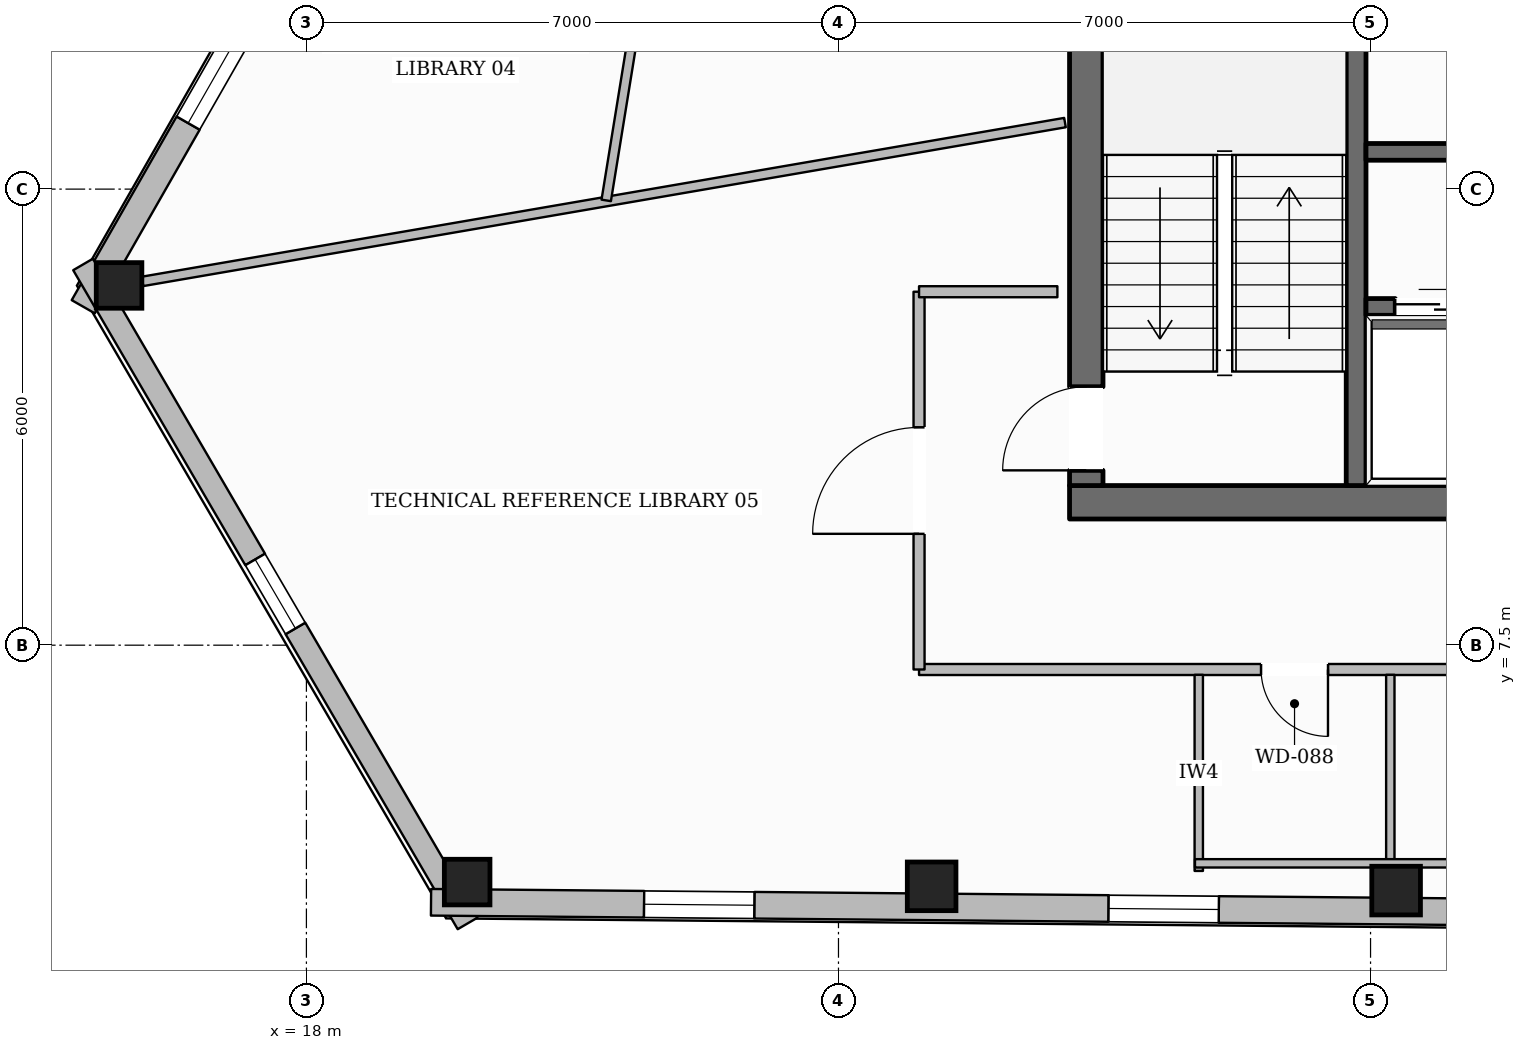
"""IFC4 building model, lengths in metres.
Left out: names, types, materials, properties, quantities, classifications, styles, units other than length and angle.
Written with IfcOpenShell. Run it as: python <this file> out.ifc"""

import sys

from ifc_helpers import new_model, si_unit, direction, frame, frame_2d, origin, origin_2d, place, context, subcontext, project, spatial, rectangle, hollow_rectangle, extrude, element, fill, save


model = new_model("IFC4")
c1 = context("Model", 3, precision=1e-05, world=origin(), true_north=direction((0.0, 1.0)))
c2 = subcontext(c1, "Body", "Model", "MODEL_VIEW")
j1 = project(units=[si_unit("LENGTHUNIT", "METRE"), si_unit("PLANEANGLEUNIT", "RADIAN")], contexts=[c1])
p1 = place(None, origin())
s1 = spatial("IfcSite", under=j1, at=p1, CompositionType="ELEMENT")
p2 = place(p1, origin())
s2 = spatial("IfcBuilding", under=s1, at=p2, CompositionType="ELEMENT")
p3 = place(p2, frame((0.0, 0.0, 180.4)))
s3 = spatial("IfcBuildingStorey", under=s2, at=p3, CompositionType="ELEMENT", Elevation=180.4)
p4 = place(p3, frame((28.04, 9.38, 0.0), z_axis=(0.0, 0.0, 1.0), x_axis=(1.0, 0.0, 0.0)))
e1 = element("IfcWall", 1, at=p4, inside=s3, PredefinedType="SOLIDWALL", context=c2, shape_type="SweptSolid", body=[
    extrude(rectangle(XDim=19.92, YDim=0.44, at=frame_2d((9.96, 0.0))), origin(), (0.0, 0.0, 1.0), 3.6),
])
p5 = place(p4, frame((10.46, 0.0, 0.0)))
e2 = element("IfcOpeningElement", 2, at=p5, cuts=e1, PredefinedType="OPENING", context=c2, shape_type="SweptSolid", body=[
    extrude(rectangle(XDim=1.4, YDim=2.2, at=frame_2d((0.7, 1.1))), frame((0.0, 0.23, 0.0), z_axis=(0.0, -1.0, 0.0), x_axis=(1.0, 0.0, 0.0)), (0.0, 0.0, 1.0), 0.46),
])
p6 = place(p3, frame((28.26, 9.6, 0.0), z_axis=(0.0, 0.0, 1.0), x_axis=(0.0, 1.0, 0.0)))
e3 = element("IfcWall", 3, at=p6, inside=s3, PredefinedType="SOLIDWALL", context=c2, shape_type="SweptSolid", body=[
    extrude(rectangle(XDim=13.0, YDim=0.44, at=frame_2d((6.5, 0.0))), origin(), (0.0, 0.0, 1.0), 3.6),
])
p7 = place(p6, frame((0.2, 0.0, 0.0)))
e4 = element("IfcOpeningElement", 4, at=p7, cuts=e3, PredefinedType="OPENING", context=c2, shape_type="SweptSolid", body=[
    extrude(rectangle(XDim=1.1, YDim=2.15, at=frame_2d((0.55, 1.075))), frame((0.0, 0.23, 0.0), z_axis=(0.0, -1.0, 0.0), x_axis=(1.0, 0.0, 0.0)), (0.0, 0.0, 1.0), 0.46),
])
p8 = place(p6, frame((8.4, 0.0, 0.0)))
e5 = element("IfcOpeningElement", 5, at=p8, cuts=e3, PredefinedType="OPENING", context=c2, shape_type="SweptSolid", body=[
    extrude(rectangle(XDim=0.9, YDim=2.1, at=frame_2d((0.45, 1.05))), frame((0.0, 0.23, 0.0), z_axis=(0.0, -1.0, 0.0), x_axis=(1.0, 0.0, 0.0)), (0.0, 0.0, 1.0), 0.46),
])
p9 = place(p3, frame((31.81, 9.6, 0.0), z_axis=(0.0, 0.0, 1.0), x_axis=(0.0, 1.0, 0.0)))
e6 = element("IfcWall", 6, at=p9, inside=s3, PredefinedType="SHEAR", context=c2, shape_type="SweptSolid", body=[
    extrude(rectangle(XDim=13.0, YDim=0.26, at=frame_2d((6.5, 0.0))), origin(), (0.0, 0.0, 1.0), 3.6),
])
p10 = place(p9, frame((10.925, 0.0, 0.0)))
e7 = element("IfcOpeningElement", 7, at=p10, cuts=e6, PredefinedType="OPENING", context=c2, shape_type="SweptSolid", body=[
    extrude(rectangle(XDim=1.25, YDim=2.25, at=frame_2d((0.625, 1.125))), frame((0.0, 0.14, 0.0), z_axis=(0.0, -1.0, 0.0), x_axis=(1.0, 0.0, 0.0)), (0.0, 0.0, 1.0), 0.28),
])
p11 = place(p3, frame((31.94, 13.99, 0.0), z_axis=(0.0, 0.0, 1.0), x_axis=(1.0, 0.0, 0.0)))
e8 = element("IfcWall", 8, at=p11, inside=s3, PredefinedType="SOLIDWALL", context=c2, shape_type="SweptSolid", body=[
    extrude(rectangle(XDim=12.12, YDim=0.22, at=frame_2d((6.06, 0.0))), origin(), (0.0, 0.0, 1.0), 3.6),
])
p12 = place(p11, frame((1.91, 0.0, 0.0)))
e9 = element("IfcOpeningElement", 9, at=p12, cuts=e8, PredefinedType="OPENING", context=c2, shape_type="SweptSolid", body=[
    extrude(rectangle(XDim=0.9, YDim=2.1, at=frame_2d((0.45, 1.05))), frame((0.0, 0.12, 0.0), z_axis=(0.0, -1.0, 0.0), x_axis=(1.0, 0.0, 0.0)), (0.0, 0.0, 1.0), 0.24),
])
p13 = place(p11, frame((7.95, 0.0, 0.0)))
e10 = element("IfcOpeningElement", 10, at=p13, cuts=e8, PredefinedType="OPENING", context=c2, shape_type="SweptSolid", body=[
    extrude(rectangle(XDim=1.02, YDim=2.15, at=frame_2d((0.51, 1.075))), frame((0.0, 0.12, 0.0), z_axis=(0.0, -1.0, 0.0), x_axis=(1.0, 0.0, 0.0)), (0.0, 0.0, 1.0), 0.24),
])
p14 = place(p3, frame((31.94, 11.95, 0.0), z_axis=(0.0, 0.0, 1.0), x_axis=(1.0, 0.0, 0.0)))
e11 = element("IfcWall", 11, at=p14, inside=s3, PredefinedType="SOLIDWALL", context=c2, shape_type="SweptSolid", body=[
    extrude(rectangle(XDim=6.19, YDim=0.22, at=frame_2d((3.095, 0.0))), origin(), (0.0, 0.0, 1.0), 3.6),
])
p15 = place(p14, frame((0.385, 0.0, 0.0)))
e12 = element("IfcOpeningElement", 12, at=p15, cuts=e11, PredefinedType="OPENING", context=c2, shape_type="SweptSolid", body=[
    extrude(rectangle(XDim=1.1, YDim=2.2, at=frame_2d((0.55, 1.1))), frame((0.0, 0.12, 0.0), z_axis=(0.0, -1.0, 0.0), x_axis=(1.0, 0.0, 0.0)), (0.0, 0.0, 1.0), 0.24),
])
p16 = place(p14, frame((2.435, 0.0, 0.0)))
e13 = element("IfcOpeningElement", 13, at=p16, cuts=e11, PredefinedType="OPENING", context=c2, shape_type="SweptSolid", body=[
    extrude(rectangle(XDim=1.1, YDim=2.2, at=frame_2d((0.55, 1.1))), frame((0.0, 0.12, 0.0), z_axis=(0.0, -1.0, 0.0), x_axis=(1.0, 0.0, 0.0)), (0.0, 0.0, 1.0), 0.24),
])
p17 = place(p14, frame((4.485, 0.0, 0.0)))
e14 = element("IfcOpeningElement", 14, at=p17, cuts=e11, PredefinedType="OPENING", context=c2, shape_type="SweptSolid", body=[
    extrude(rectangle(XDim=1.1, YDim=2.2, at=frame_2d((0.55, 1.1))), frame((0.0, 0.12, 0.0), z_axis=(0.0, -1.0, 0.0), x_axis=(1.0, 0.0, 0.0)), (0.0, 0.0, 1.0), 0.24),
])
for number, where, z_axis, x_axis in (
    (15, (15.535, 12.233, 0.0), (0.0, 0.0, 1.0), (1.0, 0.0, 0.0)),
    (16, (20.115, 4.383, 0.0), (0.0, 0.0, 1.0), (1.0, 0.0, 0.0)),
):
    element("IfcColumn", number, at=place(p3, frame(where, z_axis=z_axis, x_axis=x_axis)), inside=s3, PredefinedType="COLUMN", context=c2, shape_type="SweptSolid", body=[
        extrude(hollow_rectangle(XDim=0.6, YDim=0.6, WallThickness=0.028, at=origin_2d()), origin(), (0.0, 0.0, 1.0), 3.6),
    ])
for number, where, z_axis, x_axis in (
    (17, (26.226, 4.327, 0.0), (0.0, 0.0, 1.0), (1.0, 0.0, 0.0)),
    (18, (32.336, 4.271, 0.0), (0.0, 0.0, 1.0), (1.0, 0.0, 0.0)),
):
    element("IfcColumn", number, at=place(p3, frame(where, z_axis=z_axis, x_axis=x_axis)), inside=s3, PredefinedType="COLUMN", context=c2, shape_type="SweptSolid", body=[
        extrude(hollow_rectangle(XDim=0.64, YDim=0.64, WallThickness=0.028, at=origin_2d()), origin(), (0.0, 0.0, 1.0), 3.6),
    ])
p18 = place(p3, frame((15.064, 11.953, 0.0), z_axis=(0.0, 0.0, 1.0), x_axis=(0.495993114815, 0.86832645362, 0.0)))
e19 = element("IfcWall", 19, at=p18, inside=s3, PredefinedType="STANDARD", context=c2, shape_type="SweptSolid", body=[
    extrude(rectangle(XDim=37.324, YDim=0.35, at=frame_2d((18.662, 0.0))), origin(), (0.0, 0.0, 1.0), 3.132),
])
p19 = place(p18, frame((33.087, 0.0, 0.65)))
e20 = element("IfcOpeningElement", 20, at=p19, cuts=e19, PredefinedType="OPENING", context=c2, shape_type="SweptSolid", body=[
    extrude(rectangle(XDim=1.45, YDim=1.75, at=frame_2d((0.725, 0.875))), frame((0.0, 0.185, 0.0), z_axis=(0.0, -1.0, 0.0), x_axis=(1.0, 0.0, 0.0)), (0.0, 0.0, 1.0), 0.37),
])
p20 = place(p18, frame((27.026, 0.0, 0.65)))
e21 = element("IfcOpeningElement", 21, at=p20, cuts=e19, PredefinedType="OPENING", context=c2, shape_type="SweptSolid", body=[
    extrude(rectangle(XDim=1.45, YDim=1.75, at=frame_2d((0.725, 0.875))), frame((0.0, 0.185, 0.0), z_axis=(0.0, -1.0, 0.0), x_axis=(1.0, 0.0, 0.0)), (0.0, 0.0, 1.0), 0.37),
])
p21 = place(p18, frame((14.904, 0.0, 0.65)))
e22 = element("IfcOpeningElement", 22, at=p21, cuts=e19, PredefinedType="OPENING", context=c2, shape_type="SweptSolid", body=[
    extrude(rectangle(XDim=1.45, YDim=1.75, at=frame_2d((0.725, 0.875))), frame((0.0, 0.185, 0.0), z_axis=(0.0, -1.0, 0.0), x_axis=(1.0, 0.0, 0.0)), (0.0, 0.0, 1.0), 0.37),
])
p22 = place(p18, frame((8.844, 0.0, 0.65)))
e23 = element("IfcOpeningElement", 23, at=p22, cuts=e19, PredefinedType="OPENING", context=c2, shape_type="SweptSolid", body=[
    extrude(rectangle(XDim=1.45, YDim=1.75, at=frame_2d((0.725, 0.875))), frame((0.0, 0.185, 0.0), z_axis=(0.0, -1.0, 0.0), x_axis=(1.0, 0.0, 0.0)), (0.0, 0.0, 1.0), 0.37),
])
p23 = place(p18, frame((2.782, 0.0, 0.65)))
e24 = element("IfcOpeningElement", 24, at=p23, cuts=e19, PredefinedType="OPENING", context=c2, shape_type="SweptSolid", body=[
    extrude(rectangle(XDim=1.45, YDim=1.75, at=frame_2d((0.725, 0.875))), frame((0.0, 0.185, 0.0), z_axis=(0.0, -1.0, 0.0), x_axis=(1.0, 0.0, 0.0)), (0.0, 0.0, 1.0), 0.37),
])
p24 = place(p3, frame((20.12, 3.839, 0.0), z_axis=(0.0, 0.0, 1.0), x_axis=(-0.503937564299, 0.863740083178, 0.0)))
e25 = element("IfcWall", 25, at=p24, inside=s3, PredefinedType="STANDARD", context=c2, shape_type="SweptSolid", body=[
    extrude(rectangle(XDim=10.038, YDim=0.3, at=frame_2d((5.019, 0.0))), origin(), (0.0, 0.0, 1.0), 3.132),
])
p25 = place(p24, frame((4.494, 0.0, 0.65)))
e26 = element("IfcOpeningElement", 26, at=p25, cuts=e25, PredefinedType="OPENING", context=c2, shape_type="SweptSolid", body=[
    extrude(rectangle(XDim=1.05, YDim=1.7, at=frame_2d((0.525, 0.85))), frame((0.0, 0.16, 0.0), z_axis=(0.0, -1.0, 0.0), x_axis=(1.0, 0.0, 0.0)), (0.0, 0.0, 1.0), 0.32),
])
p26 = place(p3, frame((57.259, 3.773, 0.0), z_axis=(0.0, 0.0, 1.0), x_axis=(-0.999958016909, 0.009163210113, 0.0)))
e27 = element("IfcWall", 27, at=p26, inside=s3, PredefinedType="STANDARD", context=c2, shape_type="SweptSolid", body=[
    extrude(rectangle(XDim=37.621, YDim=0.35, at=frame_2d((18.81, 0.0))), origin(), (0.0, 0.0, 1.0), 3.132),
])
p27 = place(p26, frame((33.368, 0.0, 0.65)))
e28 = element("IfcOpeningElement", 28, at=p27, cuts=e27, PredefinedType="OPENING", context=c2, shape_type="SweptSolid", body=[
    extrude(rectangle(XDim=1.45, YDim=1.75, at=frame_2d((0.725, 0.875))), frame((0.0, 0.185, 0.0), z_axis=(0.0, -1.0, 0.0), x_axis=(1.0, 0.0, 0.0)), (0.0, 0.0, 1.0), 0.37),
])
p28 = place(p26, frame((27.257, 0.0, 0.65)))
e29 = element("IfcOpeningElement", 29, at=p28, cuts=e27, PredefinedType="OPENING", context=c2, shape_type="SweptSolid", body=[
    extrude(rectangle(XDim=1.45, YDim=1.75, at=frame_2d((0.725, 0.875))), frame((0.0, 0.185, 0.0), z_axis=(0.0, -1.0, 0.0), x_axis=(1.0, 0.0, 0.0)), (0.0, 0.0, 1.0), 0.37),
])
p29 = place(p26, frame((15.034, 0.0, 0.65)))
e30 = element("IfcOpeningElement", 30, at=p29, cuts=e27, PredefinedType="OPENING", context=c2, shape_type="SweptSolid", body=[
    extrude(rectangle(XDim=1.45, YDim=1.75, at=frame_2d((0.725, 0.875))), frame((0.0, 0.185, 0.0), z_axis=(0.0, -1.0, 0.0), x_axis=(1.0, 0.0, 0.0)), (0.0, 0.0, 1.0), 0.37),
])
p30 = place(p26, frame((8.923, 0.0, 0.65)))
e31 = element("IfcOpeningElement", 31, at=p30, cuts=e27, PredefinedType="OPENING", context=c2, shape_type="SweptSolid", body=[
    extrude(rectangle(XDim=1.45, YDim=1.75, at=frame_2d((0.725, 0.875))), frame((0.0, 0.185, 0.0), z_axis=(0.0, -1.0, 0.0), x_axis=(1.0, 0.0, 0.0)), (0.0, 0.0, 1.0), 0.37),
])
p31 = place(p26, frame((2.812, 0.0, 0.65)))
e32 = element("IfcOpeningElement", 32, at=p31, cuts=e27, PredefinedType="OPENING", context=c2, shape_type="SweptSolid", body=[
    extrude(rectangle(XDim=1.45, YDim=1.75, at=frame_2d((0.725, 0.875))), frame((0.0, 0.185, 0.0), z_axis=(0.0, -1.0, 0.0), x_axis=(1.0, 0.0, 0.0)), (0.0, 0.0, 1.0), 0.37),
])
p32 = place(p3, frame((49.94, 7.18, 0.0), z_axis=(0.0, 0.0, 1.0), x_axis=(-1.0, 0.0, 0.0)))
e33 = element("IfcWall", 33, at=p32, inside=s3, PredefinedType="PARTITIONING", context=c2, shape_type="SweptSolid", body=[
    extrude(rectangle(XDim=23.88, YDim=0.145, at=frame_2d((11.94, 0.0))), origin(), (0.0, 0.0, 1.0), 3.6),
])
p33 = place(p32, frame((18.5, 0.0, 0.0)))
e34 = element("IfcOpeningElement", 34, at=p33, cuts=e33, PredefinedType="OPENING", context=c2, shape_type="SweptSolid", body=[
    extrude(rectangle(XDim=0.88, YDim=2.1, at=frame_2d((0.44, 1.05))), frame((0.0, 0.083, 0.0), z_axis=(0.0, -1.0, 0.0), x_axis=(1.0, 0.0, 0.0)), (0.0, 0.0, 1.0), 0.165),
])
p34 = place(p32, frame((15.98, 0.0, 0.0)))
e35 = element("IfcOpeningElement", 35, at=p34, cuts=e33, PredefinedType="OPENING", context=c2, shape_type="SweptSolid", body=[
    extrude(rectangle(XDim=0.88, YDim=2.1, at=frame_2d((0.44, 1.05))), frame((0.0, 0.083, 0.0), z_axis=(0.0, -1.0, 0.0), x_axis=(1.0, 0.0, 0.0)), (0.0, 0.0, 1.0), 0.165),
])
p35 = place(p32, frame((13.52, 0.0, 0.0)))
e36 = element("IfcOpeningElement", 36, at=p35, cuts=e33, PredefinedType="OPENING", context=c2, shape_type="SweptSolid", body=[
    extrude(rectangle(XDim=0.96, YDim=2.1, at=frame_2d((0.48, 1.05))), frame((0.0, 0.083, 0.0), z_axis=(0.0, -1.0, 0.0), x_axis=(1.0, 0.0, 0.0)), (0.0, 0.0, 1.0), 0.165),
])
p36 = place(p32, frame((9.446, 0.0, 0.0)))
e37 = element("IfcOpeningElement", 37, at=p36, cuts=e33, PredefinedType="OPENING", context=c2, shape_type="SweptSolid", body=[
    extrude(rectangle(XDim=0.98, YDim=2.15, at=frame_2d((0.49, 1.075))), frame((0.0, 0.083, 0.0), z_axis=(0.0, -1.0, 0.0), x_axis=(1.0, 0.0, 0.0)), (0.0, 0.0, 1.0), 0.165),
])
p37 = place(p3, frame((26.06, 7.18, 0.0), z_axis=(0.0, 0.0, 1.0), x_axis=(0.0, 1.0, 0.0)))
e38 = element("IfcWall", 38, at=p37, inside=s3, PredefinedType="PARTITIONING", context=c2, shape_type="SweptSolid", body=[
    extrude(rectangle(XDim=4.97, YDim=0.145, at=frame_2d((2.485, 0.0))), origin(), (0.0, 0.0, 1.0), 3.6),
])
p38 = place(p37, frame((1.785, 0.0, 0.0)))
e39 = element("IfcOpeningElement", 39, at=p38, cuts=e38, PredefinedType="OPENING", context=c2, shape_type="SweptSolid", body=[
    extrude(rectangle(XDim=1.4, YDim=2.2, at=frame_2d((0.7, 1.1))), frame((0.0, 0.083, 0.0), z_axis=(0.0, -1.0, 0.0), x_axis=(1.0, 0.0, 0.0)), (0.0, 0.0, 1.0), 0.165),
])
p39 = place(p3, frame((26.06, 12.15, 0.0), z_axis=(0.0, 0.0, 1.0), x_axis=(1.0, 0.0, 0.0)))
e40 = element("IfcWall", 40, at=p39, inside=s3, PredefinedType="PARTITIONING", context=c2, shape_type="SweptSolid", body=[
    extrude(rectangle(XDim=1.82, YDim=0.145, at=frame_2d((0.91, 0.0))), origin(), (0.0, 0.0, 1.0), 3.141),
])
p40 = place(p3, frame((29.74, 4.53, 0.0), z_axis=(0.0, 0.0, 1.0), x_axis=(0.0, 1.0, 0.0)))
e41 = element("IfcWall", 41, at=p40, inside=s3, PredefinedType="PLUMBINGWALL", context=c2, shape_type="SweptSolid", body=[
    extrude(rectangle(XDim=2.58, YDim=0.11, at=frame_2d((1.29, 0.0))), origin(), (0.0, 0.0, 1.0), 3.6),
])
p41 = place(p3, frame((32.26, 4.53, 0.0), z_axis=(0.0, 0.0, 1.0), x_axis=(0.0, 1.0, 0.0)))
e42 = element("IfcWall", 42, at=p41, inside=s3, PredefinedType="PLUMBINGWALL", context=c2, shape_type="SweptSolid", body=[
    extrude(rectangle(XDim=2.58, YDim=0.11, at=frame_2d((1.29, 0.0))), origin(), (0.0, 0.0, 1.0), 3.141),
])
p42 = place(p3, frame((29.69, 4.63, 0.0), z_axis=(0.0, 0.0, 1.0), x_axis=(1.0, 0.0, 0.0)))
e43 = element("IfcWall", 43, at=p42, inside=s3, PredefinedType="PLUMBINGWALL", context=c2, shape_type="SweptSolid", body=[
    extrude(rectangle(XDim=7.46, YDim=0.11, at=frame_2d((3.73, 0.0))), origin(), (0.0, 0.0, 1.0), 3.6),
])
p43 = place(p3, frame((27.98, 14.375, 0.0), z_axis=(0.0, 0.0, 1.0), x_axis=(-0.9855033492, -0.169655971646, 0.0)))
e44 = element("IfcWall", 44, at=p43, inside=s3, PredefinedType="PARTITIONING", context=c2, shape_type="SweptSolid", body=[
    extrude(rectangle(XDim=12.315, YDim=0.125, at=frame_2d((6.158, 0.0))), origin(), (0.0, 0.0, 1.0), 3.141),
])
p44 = place(p3, frame((24.273, 27.694, 0.0), z_axis=(0.0, 0.0, 1.0), x_axis=(-0.160245052552, -0.987077263, 0.0)))
e45 = element("IfcWall", 45, at=p44, inside=s3, PredefinedType="PARTITIONING", context=c2, shape_type="SweptSolid", body=[
    extrude(rectangle(XDim=14.53, YDim=0.125, at=frame_2d((7.265, 0.0))), origin(), (0.0, 0.0, 1.0), 3.135),
])
p45 = place(p44, frame((6.665, 0.0, 0.0)))
e46 = element("IfcOpeningElement", 46, at=p45, cuts=e45, PredefinedType="OPENING", context=c2, shape_type="SweptSolid", body=[
    extrude(rectangle(XDim=0.98, YDim=2.15, at=frame_2d((0.49, 1.075))), frame((0.0, 0.073, 0.0), z_axis=(0.0, -1.0, 0.0), x_axis=(1.0, 0.0, 0.0)), (0.0, 0.0, 1.0), 0.145),
])
p46 = place(p23, origin())
e47 = element("IfcWindow", 47, at=p46, inside=s3, PartitioningType="SINGLE_PANEL", PredefinedType="WINDOW", context=c2, shape_type="SweptSolid", body=[
    extrude(rectangle(XDim=1.45, YDim=1.75, at=frame_2d((0.725, 0.875))), frame((0.0, 0.03, 0.0), z_axis=(0.0, -1.0, 0.0), x_axis=(1.0, 0.0, 0.0)), (0.0, 0.0, 1.0), 0.06),
])
fill(e24, e47)
p47 = place(p27, origin())
e48 = element("IfcWindow", 48, at=p47, inside=s3, PartitioningType="SINGLE_PANEL", PredefinedType="WINDOW", context=c2, shape_type="SweptSolid", body=[
    extrude(rectangle(XDim=1.45, YDim=1.75, at=frame_2d((0.725, 0.875))), frame((0.0, 0.03, 0.0), z_axis=(0.0, -1.0, 0.0), x_axis=(1.0, 0.0, 0.0)), (0.0, 0.0, 1.0), 0.06),
])
fill(e28, e48)
p48 = place(p28, origin())
e49 = element("IfcWindow", 49, at=p48, inside=s3, PartitioningType="SINGLE_PANEL", PredefinedType="WINDOW", context=c2, shape_type="SweptSolid", body=[
    extrude(rectangle(XDim=1.45, YDim=1.75, at=frame_2d((0.725, 0.875))), frame((0.0, 0.03, 0.0), z_axis=(0.0, -1.0, 0.0), x_axis=(1.0, 0.0, 0.0)), (0.0, 0.0, 1.0), 0.06),
])
fill(e29, e49)
p49 = place(p25, origin())
e50 = element("IfcWindow", 50, at=p49, inside=s3, PartitioningType="SINGLE_PANEL", PredefinedType="WINDOW", context=c2, shape_type="SweptSolid", body=[
    extrude(rectangle(XDim=1.05, YDim=1.7, at=frame_2d((0.525, 0.85))), frame((0.0, 0.03, 0.0), z_axis=(0.0, -1.0, 0.0), x_axis=(1.0, 0.0, 0.0)), (0.0, 0.0, 1.0), 0.06),
])
fill(e26, e50)
p50 = place(p7, origin())
e51 = element("IfcDoor", 51, at=p50, inside=s3, OperationType="SINGLE_SWING_LEFT", PredefinedType="DOOR", context=c2, shape_type="SweptSolid", body=[
    extrude(rectangle(XDim=1.1, YDim=2.15, at=frame_2d((0.55, 1.075))), frame((0.0, 0.025, 0.0), z_axis=(0.0, -1.0, 0.0), x_axis=(1.0, 0.0, 0.0)), (0.0, 0.0, 1.0), 0.05),
])
fill(e4, e51)
p51 = place(p15, origin())
e52 = element("IfcDoor", 52, at=p51, inside=s3, OperationType="DOUBLE_DOOR_SLIDING", PredefinedType="DOOR", context=c2, shape_type="SweptSolid", body=[
    extrude(rectangle(XDim=1.1, YDim=2.2, at=frame_2d((0.55, 1.1))), frame((0.0, 0.025, 0.0), z_axis=(0.0, -1.0, 0.0), x_axis=(1.0, 0.0, 0.0)), (0.0, 0.0, 1.0), 0.05),
])
fill(e12, e52)
p52 = place(p33, origin())
e53 = element("IfcDoor", 53, at=p52, inside=s3, OperationType="SINGLE_SWING_LEFT", PredefinedType="DOOR", context=c2, shape_type="SweptSolid", body=[
    extrude(rectangle(XDim=0.88, YDim=2.1, at=frame_2d((0.44, 1.05))), frame((0.0, 0.025, 0.0), z_axis=(0.0, -1.0, 0.0), x_axis=(1.0, 0.0, 0.0)), (0.0, 0.0, 1.0), 0.05),
])
fill(e34, e53)
p53 = place(p38, origin())
e54 = element("IfcDoor", 54, at=p53, inside=s3, OperationType="SINGLE_SWING_LEFT", PredefinedType="DOOR", context=c2, shape_type="SweptSolid", body=[
    extrude(rectangle(XDim=1.4, YDim=2.2, at=frame_2d((0.7, 1.1))), frame((0.0, 0.025, 0.0), z_axis=(0.0, -1.0, 0.0), x_axis=(1.0, 0.0, 0.0)), (0.0, 0.0, 1.0), 0.05),
])
fill(e39, e54)
save(model, sys.argv[1])
